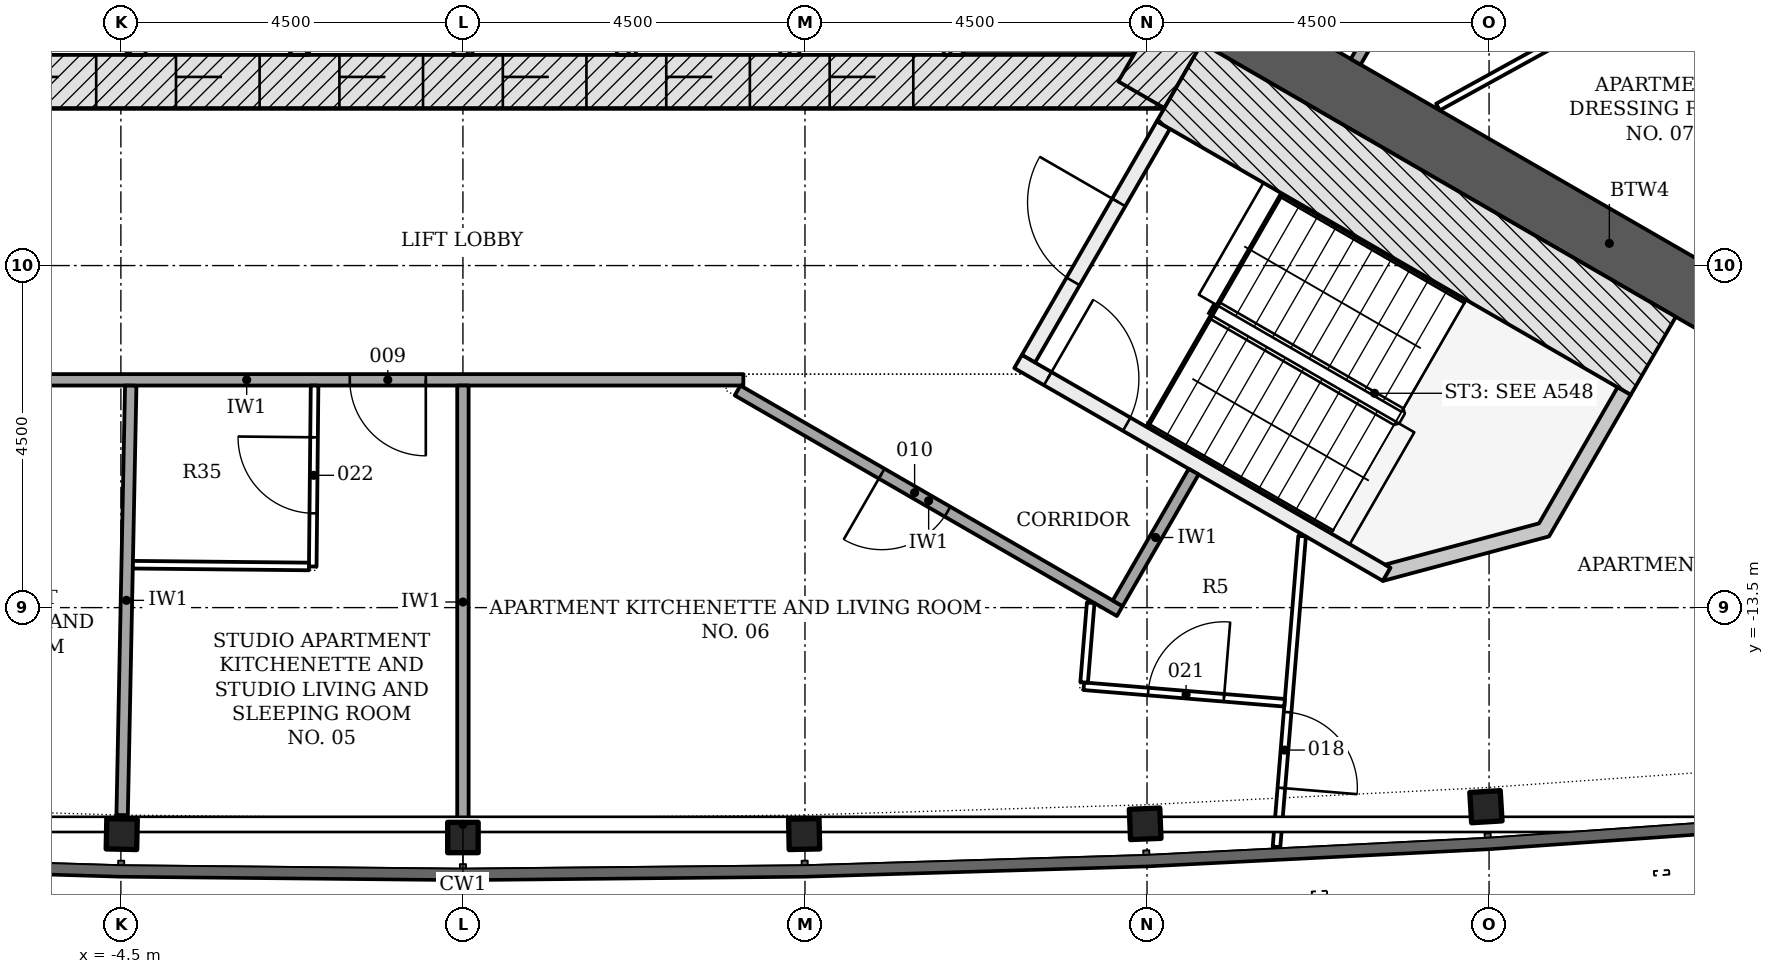
"""IFC4 building model, lengths in metres.
Left out: names, types, materials, properties, quantities, classifications, styles, units other than length and angle.
Written with IfcOpenShell. Run it as: python <this file> out.ifc"""

import sys

from ifc_helpers import new_model, si_unit, direction, frame, frame_2d, origin, origin_2d, place, context, subcontext, project, spatial, polyline, rectangle, i_section, outline, extrude, element, fill, save


model = new_model("IFC4")
c1 = context("Model", 3, precision=1e-05, world=origin(), true_north=direction((0.0, 1.0)))
c2 = subcontext(c1, "Body", "Model", "MODEL_VIEW")
j1 = project(units=[si_unit("LENGTHUNIT", "METRE"), si_unit("PLANEANGLEUNIT", "RADIAN")], contexts=[c1])
p1 = place(None, origin())
s1 = spatial("IfcSite", under=j1, at=p1, CompositionType="ELEMENT")
p2 = place(p1, origin())
s2 = spatial("IfcBuilding", under=s1, at=p2, CompositionType="ELEMENT")
p3 = place(p2, frame((0.0, 0.0, 109.5)))
s3 = spatial("IfcBuildingStorey", under=s2, at=p3, CompositionType="ELEMENT", Elevation=109.5)
p4 = place(p3, frame((-9.229, -6.578, -0.2), z_axis=(0.0, 0.0, 1.0), x_axis=(1.0, 0.0, 0.0)))
e1 = element("IfcWall", 1, at=p4, inside=s3, PredefinedType="SHEAR", context=c2, shape_type="SweptSolid", body=[
    extrude(rectangle(XDim=18.458, YDim=0.7, at=frame_2d((9.229, 0.0))), origin(), (0.0, 0.0, 1.0), 3.6),
])
p5 = place(p4, frame((3.304, 0.0, 0.2)))
e2 = element("IfcOpeningElement", 2, at=p5, cuts=e1, PredefinedType="OPENING", context=c2, shape_type="SweptSolid", body=[
    extrude(rectangle(XDim=1.1, YDim=2.1, at=frame_2d((0.55, 1.05))), frame((0.0, 0.36, 0.0), z_axis=(0.0, -1.0, 0.0), x_axis=(1.0, 0.0, 0.0)), (0.0, 0.0, 1.0), 0.72),
])
p6 = place(p4, frame((5.454, 0.0, 0.2)))
e3 = element("IfcOpeningElement", 3, at=p6, cuts=e1, PredefinedType="OPENING", context=c2, shape_type="SweptSolid", body=[
    extrude(rectangle(XDim=1.1, YDim=2.1, at=frame_2d((0.55, 1.05))), frame((0.0, 0.36, 0.0), z_axis=(0.0, -1.0, 0.0), x_axis=(1.0, 0.0, 0.0)), (0.0, 0.0, 1.0), 0.72),
])
p7 = place(p4, frame((7.604, 0.0, 0.2)))
e4 = element("IfcOpeningElement", 4, at=p7, cuts=e1, PredefinedType="OPENING", context=c2, shape_type="SweptSolid", body=[
    extrude(rectangle(XDim=1.1, YDim=2.1, at=frame_2d((0.55, 1.05))), frame((0.0, 0.36, 0.0), z_axis=(0.0, -1.0, 0.0), x_axis=(1.0, 0.0, 0.0)), (0.0, 0.0, 1.0), 0.72),
])
p8 = place(p4, frame((9.754, 0.0, 0.2)))
e5 = element("IfcOpeningElement", 5, at=p8, cuts=e1, PredefinedType="OPENING", context=c2, shape_type="SweptSolid", body=[
    extrude(rectangle(XDim=1.1, YDim=2.1, at=frame_2d((0.55, 1.05))), frame((0.0, 0.36, 0.0), z_axis=(0.0, -1.0, 0.0), x_axis=(1.0, 0.0, 0.0)), (0.0, 0.0, 1.0), 0.72),
])
p9 = place(p4, frame((11.904, 0.0, 0.2)))
e6 = element("IfcOpeningElement", 6, at=p9, cuts=e1, PredefinedType="OPENING", context=c2, shape_type="SweptSolid", body=[
    extrude(rectangle(XDim=1.1, YDim=2.1, at=frame_2d((0.55, 1.05))), frame((0.0, 0.36, 0.0), z_axis=(0.0, -1.0, 0.0), x_axis=(1.0, 0.0, 0.0)), (0.0, 0.0, 1.0), 0.72),
])
p10 = place(p4, frame((14.054, 0.0, 0.2)))
e7 = element("IfcOpeningElement", 7, at=p10, cuts=e1, PredefinedType="OPENING", context=c2, shape_type="SweptSolid", body=[
    extrude(rectangle(XDim=1.1, YDim=2.1, at=frame_2d((0.55, 1.05))), frame((0.0, 0.36, 0.0), z_axis=(0.0, -1.0, 0.0), x_axis=(1.0, 0.0, 0.0)), (0.0, 0.0, 1.0), 0.72),
])
p11 = place(p4, frame((1.029, 0.0, 0.2)))
e8 = element("IfcOpeningElement", 8, at=p11, cuts=e1, PredefinedType="OPENING", context=c2, shape_type="SweptSolid", body=[
    extrude(rectangle(XDim=1.0, YDim=2.1, at=frame_2d((0.5, 1.05))), frame((0.0, 0.36, 0.0), z_axis=(0.0, -1.0, 0.0), x_axis=(1.0, 0.0, 0.0)), (0.0, 0.0, 1.0), 0.72),
])
p12 = place(p3, frame((8.926, -6.753, -0.2), z_axis=(0.0, 0.0, 1.0), x_axis=(0.500042739161, 0.866000726912, 0.0)))
e9 = element("IfcWall", 9, at=p12, inside=s3, PredefinedType="SHEAR", context=c2, shape_type="SweptSolid", body=[
    extrude(rectangle(XDim=2.771, YDim=0.7, at=frame_2d((1.386, 0.0))), origin(), (0.0, 0.0, 1.0), 3.6),
])
p13 = place(p3, frame((9.922, -5.728, -0.2), z_axis=(0.0, 0.0, 1.0), x_axis=(0.866027307971, -0.499996701837, 0.0)))
e10 = element("IfcWall", 10, at=p13, inside=s3, PredefinedType="SHEAR", context=c2, shape_type="SweptSolid", body=[
    extrude(rectangle(XDim=11.918, YDim=0.8, at=frame_2d((5.959, 0.0))), origin(), (0.0, 0.0, 1.0), 3.6),
])
for number, where, z_axis, x_axis in (
    (11, (-4.489, -16.479, -0.2), (0.0, 0.0, 1.0), (1.0, -0.02, 0.0)),
    (12, (0.0, -16.524, -0.2), (0.0, 0.0, 1.0), (1.0, 0.0, 0.0)),
    (13, (4.489, -16.479, -0.2), (0.0, 0.0, 1.0), (1.0, 0.02, 0.0)),
    (14, (8.976, -16.344, -0.2), (0.0, 0.0, 1.0), (0.999, 0.04, 0.0)),
    (15, (13.459, -16.119, -0.2), (0.0, 0.0, 1.0), (0.998, 0.06, 0.0)),
):
    element("IfcColumn", number, at=place(p3, frame(where, z_axis=z_axis, x_axis=x_axis)), inside=s3, PredefinedType="COLUMN", context=c2, shape_type="SweptSolid", body=[
        extrude(i_section(OverallWidth=0.401, OverallDepth=0.399, WebThickness=0.025, FlangeThickness=0.04, FilletRadius=0.015, at=origin_2d()), origin(), (0.0, 0.0, 1.0), 3.6),
    ])
for number, where, z_axis, x_axis in (
    (16, (-4.3, -6.228, -0.2), (0.0, 0.0, 1.0), (0.0, 1.0, 0.0)),
    (17, (-2.15, -6.228, -0.2), (0.0, 0.0, 1.0), (0.0, 1.0, 0.0)),
    (18, (0.0, -6.228, -0.2), (0.0, 0.0, 1.0), (0.0, 1.0, 0.0)),
    (19, (2.15, -6.228, -0.2), (0.0, 0.0, 1.0), (0.0, 1.0, 0.0)),
    (20, (4.3, -6.228, -0.2), (0.0, 0.0, 1.0), (0.0, 1.0, 0.0)),
    (21, (6.45, -6.228, -0.2), (0.0, 0.0, 1.0), (0.0, 1.0, 0.0)),
):
    element("IfcWall", number, at=place(p3, frame(where, z_axis=z_axis, x_axis=x_axis)), inside=s3, PredefinedType="PARTITIONING", context=c2, shape_type="SweptSolid", body=[
        extrude(rectangle(XDim=2.5, YDim=0.25, at=frame_2d((1.25, 0.0))), origin(), (0.0, 0.0, 1.0), 3.6),
    ])
p14 = place(p3, frame((7.44, -10.226, -0.2), z_axis=(0.0, 0.0, 1.0), x_axis=(0.500022077904, 0.866012656725, 0.0)))
e22 = element("IfcWall", 22, at=p14, inside=s3, PredefinedType="SHEAR", context=c2, shape_type="SweptSolid", body=[
    extrude(rectangle(XDim=3.55, YDim=0.2, at=frame_2d((1.775, 0.0))), origin(), (0.0, 0.0, 1.0), 3.6),
])
p15 = place(p14, frame((1.175, 0.0, 0.2)))
e23 = element("IfcOpeningElement", 23, at=p15, cuts=e22, PredefinedType="OPENING", context=c2, shape_type="SweptSolid", body=[
    extrude(rectangle(XDim=1.2, YDim=2.1, at=frame_2d((0.6, 1.05))), frame((0.0, 0.11, 0.0), z_axis=(0.0, -1.0, 0.0), x_axis=(1.0, 0.0, 0.0)), (0.0, 0.0, 1.0), 0.22),
])
p16 = place(p3, frame((7.304, -10.262, -0.2), z_axis=(0.0, 0.0, 1.0), x_axis=(0.866026594901, -0.49999793692, 0.0)))
e24 = element("IfcWall", 24, at=p16, inside=s3, PredefinedType="SHEAR", context=c2, shape_type="SweptSolid", body=[
    extrude(rectangle(XDim=5.6, YDim=0.2, at=frame_2d((2.8, 0.0))), origin(), (0.0, 0.0, 1.0), 3.6),
])
p17 = place(p16, frame((0.45, 0.0, 0.2)))
e25 = element("IfcOpeningElement", 25, at=p17, cuts=e24, PredefinedType="OPENING", context=c2, shape_type="SweptSolid", body=[
    extrude(rectangle(XDim=1.2, YDim=2.1, at=frame_2d((0.6, 1.05))), frame((0.0, 0.11, 0.0), z_axis=(0.0, -1.0, 0.0), x_axis=(1.0, 0.0, 0.0)), (0.0, 0.0, 1.0), 0.22),
])
p18 = place(p3, frame((9.425, -6.588, -0.2), z_axis=(0.0, 0.0, 1.0), x_axis=(0.866018442252, -0.500012057535, 0.0)))
e26 = element("IfcWall", 26, at=p18, inside=s3, PredefinedType="SHEAR", context=c2, shape_type="SweptSolid", body=[
    extrude(rectangle(XDim=7.2, YDim=1.186, at=frame_2d((3.6, 0.0))), origin(), (0.0, 0.0, 1.0), 3.6),
])
p19 = place(p3, frame((0.0, 0.0, -0.2)))
e27 = element("IfcWall", 27, at=p19, inside=s3, PredefinedType="SHEAR", context=c2, shape_type="SweptSolid", body=[
    extrude(outline(polyline([(12.104, -13.149), (14.289, -12.563), (15.364, -10.701), (15.191, -10.601), (14.157, -12.392), (12.132, -12.934), (12.204, -12.976), (12.204, -12.976), (12.204, -12.976), (12.204, -12.976), (12.204, -12.976), (12.204, -12.976), (12.204, -12.976), (12.204, -12.976), (12.204, -12.976), (12.204, -12.976), (12.204, -12.976), (12.204, -12.976), (12.204, -12.976), (12.204, -12.976), (12.204, -12.976), (12.204, -12.976), (12.204, -12.976), (12.104, -13.149)])), origin(), (0.0, 0.0, 1.0), 3.6),
])
p20 = place(p3, frame((3.689, -10.503, 0.0), z_axis=(0.0, 0.0, 1.0), x_axis=(-1.0, 0.0, 0.0)))
e28 = element("IfcWall", 28, at=p20, inside=s3, PredefinedType="PARTITIONING", context=c2, shape_type="SweptSolid", body=[
    extrude(rectangle(XDim=13.068, YDim=0.15, at=frame_2d((6.534, 0.0))), origin(), (0.0, 0.0, 1.0), 2.847),
])
p21 = place(p20, frame((9.758, 0.0, 0.0)))
e29 = element("IfcOpeningElement", 29, at=p21, cuts=e28, PredefinedType="OPENING", context=c2, shape_type="SweptSolid", body=[
    extrude(rectangle(XDim=1.0, YDim=2.1, at=frame_2d((0.5, 1.05))), frame((0.0, 0.085, 0.0), z_axis=(0.0, -1.0, 0.0), x_axis=(1.0, 0.0, 0.0)), (0.0, 0.0, 1.0), 0.17),
])
p22 = place(p20, frame((4.177, 0.0, 0.0)))
e30 = element("IfcOpeningElement", 30, at=p22, cuts=e28, PredefinedType="OPENING", context=c2, shape_type="SweptSolid", body=[
    extrude(rectangle(XDim=1.0, YDim=2.1, at=frame_2d((0.5, 1.05))), frame((0.0, 0.085, 0.0), z_axis=(0.0, -1.0, 0.0), x_axis=(1.0, 0.0, 0.0)), (0.0, 0.0, 1.0), 0.17),
])
p23 = place(p3, frame((8.641, -13.546, 0.0), z_axis=(0.0, 0.0, 1.0), x_axis=(-0.866042728627, 0.499969991291, 0.0)))
e31 = element("IfcWall", 31, at=p23, inside=s3, PredefinedType="PARTITIONING", context=c2, shape_type="SweptSolid", body=[
    extrude(rectangle(XDim=5.805, YDim=0.15, at=frame_2d((2.903, 0.0))), origin(), (0.0, 0.0, 1.0), 2.847),
])
p24 = place(p23, frame((2.616, 0.0, 0.0)))
e32 = element("IfcOpeningElement", 32, at=p24, cuts=e31, PredefinedType="OPENING", context=c2, shape_type="SweptSolid", body=[
    extrude(rectangle(XDim=1.0, YDim=2.1, at=frame_2d((0.5, 1.05))), frame((0.0, 0.085, 0.0), z_axis=(0.0, -1.0, 0.0), x_axis=(1.0, 0.0, 0.0)), (0.0, 0.0, 1.0), 0.17),
])
p25 = place(p3, frame((8.614, -13.444, 0.0), z_axis=(0.0, 0.0, 1.0), x_axis=(0.499972520799, 0.866041268327, 0.0)))
e33 = element("IfcWall", 33, at=p25, inside=s3, PredefinedType="PARTITIONING", context=c2, shape_type="SweptSolid", body=[
    extrude(rectangle(XDim=2.0, YDim=0.15, at=frame_2d((1.0, 0.0))), origin(), (0.0, 0.0, 1.0), 2.923),
])
p26 = place(p3, frame((11.745, -6.319, 0.0), z_axis=(0.0, 0.0, 1.0), x_axis=(0.500012721296, 0.866018059016, 0.0)))
e34 = element("IfcWall", 34, at=p26, inside=s3, PredefinedType="PARTITIONING", context=c2, shape_type="SweptSolid", body=[
    extrude(rectangle(XDim=1.966, YDim=0.15, at=frame_2d((0.983, 0.0))), origin(), (0.0, 0.0, 1.0), 3.4),
])
p27 = place(p3, frame((0.0, -16.274, 0.0), z_axis=(0.0, 0.0, 1.0), x_axis=(0.0, 1.0, 0.0)))
e35 = element("IfcWall", 35, at=p27, inside=s3, PredefinedType="PARTITIONING", context=c2, shape_type="SweptSolid", body=[
    extrude(rectangle(XDim=5.696, YDim=0.15, at=frame_2d((2.848, 0.0))), origin(), (0.0, 0.0, 1.0), 2.847),
])
p28 = place(p3, frame((-4.484, -16.229, 0.0), z_axis=(0.0, 0.0, 1.0), x_axis=(0.020089281754, 0.999798190016, 0.0)))
e36 = element("IfcWall", 36, at=p28, inside=s3, PredefinedType="PARTITIONING", context=c2, shape_type="SweptSolid", body=[
    extrude(rectangle(XDim=5.651, YDim=0.15, at=frame_2d((2.826, 0.0))), origin(), (0.0, 0.0, 1.0), 2.847),
])
p29 = place(p3, frame((19.703, -10.864, 0.0), z_axis=(0.0, 0.0, 1.0), x_axis=(-0.482505676042, 0.875892843096, 0.0)))
e37 = element("IfcWall", 37, at=p29, inside=s3, PredefinedType="PARTITIONING", context=c2, shape_type="SweptSolid", body=[
    extrude(rectangle(XDim=10.377, YDim=0.1, at=frame_2d((5.188, 0.0))), origin(), (0.0, 0.0, 1.0), 2.847),
])
p30 = place(p29, frame((2.864, 0.0, 0.0)))
e38 = element("IfcOpeningElement", 38, at=p30, cuts=e37, PredefinedType="OPENING", context=c2, shape_type="SweptSolid", body=[
    extrude(rectangle(XDim=1.0, YDim=2.1, at=frame_2d((0.5, 1.05))), frame((0.0, 0.06, 0.0), z_axis=(0.0, -1.0, 0.0), x_axis=(1.0, 0.0, 0.0)), (0.0, 0.0, 1.0), 0.12),
])
p31 = place(p3, frame((16.389, -4.952, 0.0), z_axis=(0.0, 0.0, 1.0), x_axis=(-0.875896259157, -0.482499474814, 0.0)))
e39 = element("IfcWall", 39, at=p31, inside=s3, PredefinedType="PARTITIONING", context=c2, shape_type="SweptSolid", body=[
    extrude(rectangle(XDim=4.066, YDim=0.1, at=frame_2d((2.033, 0.0))), origin(), (0.0, 0.0, 1.0), 3.4),
])
p32 = place(p3, frame((11.04, -12.56, 0.0), z_axis=(0.0, 0.0, 1.0), x_axis=(-0.08207509454, -0.996626147989, 0.0)))
e40 = element("IfcWall", 40, at=p32, inside=s3, PredefinedType="PARTITIONING", context=c2, shape_type="SweptSolid", body=[
    extrude(rectangle(XDim=4.102, YDim=0.1, at=frame_2d((2.051, 0.0))), origin(), (0.0, 0.0, 1.0), 2.974),
])
p33 = place(p32, frame((2.324, 0.0, 0.0)))
e41 = element("IfcOpeningElement", 41, at=p33, cuts=e40, PredefinedType="OPENING", context=c2, shape_type="SweptSolid", body=[
    extrude(rectangle(XDim=1.0, YDim=2.1, at=frame_2d((0.5, 1.05))), frame((0.0, 0.06, 0.0), z_axis=(0.0, -1.0, 0.0), x_axis=(1.0, 0.0, 0.0)), (0.0, 0.0, 1.0), 0.12),
])
p34 = place(p3, frame((8.168, -14.534, 0.0), z_axis=(0.0, 0.0, 1.0), x_axis=(0.996625350035, -0.082084783406, 0.0)))
e42 = element("IfcWall", 42, at=p34, inside=s3, PredefinedType="PARTITIONING", context=c2, shape_type="SweptSolid", body=[
    extrude(rectangle(XDim=2.65, YDim=0.1, at=frame_2d((1.325, 0.0))), origin(), (0.0, 0.0, 1.0), 2.923),
])
p35 = place(p34, frame((0.85, 0.0, 0.0)))
e43 = element("IfcOpeningElement", 43, at=p35, cuts=e42, PredefinedType="OPENING", context=c2, shape_type="SweptSolid", body=[
    extrude(rectangle(XDim=1.0, YDim=2.1, at=frame_2d((0.5, 1.05))), frame((0.0, 0.06, 0.0), z_axis=(0.0, -1.0, 0.0), x_axis=(1.0, 0.0, 0.0)), (0.0, 0.0, 1.0), 0.12),
])
p36 = place(p3, frame((-1.976, -12.959, 0.0), z_axis=(0.0, 0.0, 1.0), x_axis=(0.009947205513, 0.999950525327, 0.0)))
e44 = element("IfcWall", 44, at=p36, inside=s3, PredefinedType="PARTITIONING", context=c2, shape_type="SweptSolid", body=[
    extrude(rectangle(XDim=2.381, YDim=0.1, at=frame_2d((1.19, 0.0))), origin(), (0.0, 0.0, 1.0), 3.4),
])
p37 = place(p36, frame((0.7, 0.0, 0.0)))
e45 = element("IfcOpeningElement", 45, at=p37, cuts=e44, PredefinedType="OPENING", context=c2, shape_type="SweptSolid", body=[
    extrude(rectangle(XDim=1.0, YDim=2.1, at=frame_2d((0.5, 1.05))), frame((0.0, 0.06, 0.0), z_axis=(0.0, -1.0, 0.0), x_axis=(1.0, 0.0, 0.0)), (0.0, 0.0, 1.0), 0.12),
])
p38 = place(p3, frame((-4.342, -12.936, 0.0), z_axis=(0.0, 0.0, 1.0), x_axis=(0.999949877213, -0.010012145693, 0.0)))
e46 = element("IfcWall", 46, at=p38, inside=s3, PredefinedType="PARTITIONING", context=c2, shape_type="SweptSolid", body=[
    extrude(rectangle(XDim=2.316, YDim=0.1, at=frame_2d((1.158, 0.0))), origin(), (0.0, 0.0, 1.0), 2.847),
])
p39 = place(p3, frame((8.259, -13.437, 0.0), z_axis=(0.0, 0.0, 1.0), x_axis=(-0.082180892167, -0.99661742959, 0.0)))
e47 = element("IfcWall", 47, at=p39, inside=s3, PredefinedType="PARTITIONING", context=c2, shape_type="SweptSolid", body=[
    extrude(rectangle(XDim=1.052, YDim=0.1, at=frame_2d((0.526, 0.0))), origin(), (0.0, 0.0, 1.0), 3.4),
])
p40 = place(p5, origin())
e48 = element("IfcDoor", 48, at=p40, inside=s3, OperationType="DOUBLE_DOOR_SLIDING", PredefinedType="DOOR", context=c2, shape_type="SweptSolid", body=[
    extrude(rectangle(XDim=1.1, YDim=2.1, at=frame_2d((0.55, 1.05))), frame((0.0, 0.025, 0.0), z_axis=(0.0, -1.0, 0.0), x_axis=(1.0, 0.0, 0.0)), (0.0, 0.0, 1.0), 0.05),
])
fill(e2, e48)
p41 = place(p6, origin())
e49 = element("IfcDoor", 49, at=p41, inside=s3, OperationType="DOUBLE_DOOR_SLIDING", PredefinedType="DOOR", context=c2, shape_type="SweptSolid", body=[
    extrude(rectangle(XDim=1.1, YDim=2.1, at=frame_2d((0.55, 1.05))), frame((0.0, 0.025, 0.0), z_axis=(0.0, -1.0, 0.0), x_axis=(1.0, 0.0, 0.0)), (0.0, 0.0, 1.0), 0.05),
])
fill(e3, e49)
p42 = place(p7, origin())
e50 = element("IfcDoor", 50, at=p42, inside=s3, OperationType="DOUBLE_DOOR_SLIDING", PredefinedType="DOOR", context=c2, shape_type="SweptSolid", body=[
    extrude(rectangle(XDim=1.1, YDim=2.1, at=frame_2d((0.55, 1.05))), frame((0.0, 0.025, 0.0), z_axis=(0.0, -1.0, 0.0), x_axis=(1.0, 0.0, 0.0)), (0.0, 0.0, 1.0), 0.05),
])
fill(e4, e50)
p43 = place(p8, origin())
e51 = element("IfcDoor", 51, at=p43, inside=s3, OperationType="DOUBLE_DOOR_SLIDING", PredefinedType="DOOR", context=c2, shape_type="SweptSolid", body=[
    extrude(rectangle(XDim=1.1, YDim=2.1, at=frame_2d((0.55, 1.05))), frame((0.0, 0.025, 0.0), z_axis=(0.0, -1.0, 0.0), x_axis=(1.0, 0.0, 0.0)), (0.0, 0.0, 1.0), 0.05),
])
fill(e5, e51)
p44 = place(p9, origin())
e52 = element("IfcDoor", 52, at=p44, inside=s3, OperationType="DOUBLE_DOOR_SLIDING", PredefinedType="DOOR", context=c2, shape_type="SweptSolid", body=[
    extrude(rectangle(XDim=1.1, YDim=2.1, at=frame_2d((0.55, 1.05))), frame((0.0, 0.025, 0.0), z_axis=(0.0, -1.0, 0.0), x_axis=(1.0, 0.0, 0.0)), (0.0, 0.0, 1.0), 0.05),
])
fill(e6, e52)
p45 = place(p10, origin())
e53 = element("IfcDoor", 53, at=p45, inside=s3, OperationType="DOUBLE_DOOR_SLIDING", PredefinedType="DOOR", context=c2, shape_type="SweptSolid", body=[
    extrude(rectangle(XDim=1.1, YDim=2.1, at=frame_2d((0.55, 1.05))), frame((0.0, 0.025, 0.0), z_axis=(0.0, -1.0, 0.0), x_axis=(1.0, 0.0, 0.0)), (0.0, 0.0, 1.0), 0.05),
])
fill(e7, e53)
p46 = place(p15, origin())
e54 = element("IfcDoor", 54, at=p46, inside=s3, OperationType="SINGLE_SWING_RIGHT", PredefinedType="DOOR", context=c2, shape_type="SweptSolid", body=[
    extrude(rectangle(XDim=1.2, YDim=2.1, at=frame_2d((0.6, 1.05))), frame((0.0, 0.025, 0.0), z_axis=(0.0, -1.0, 0.0), x_axis=(1.0, 0.0, 0.0)), (0.0, 0.0, 1.0), 0.05),
])
fill(e23, e54)
p47 = place(p17, origin())
e55 = element("IfcDoor", 55, at=p47, inside=s3, OperationType="SINGLE_SWING_LEFT", PredefinedType="DOOR", context=c2, shape_type="SweptSolid", body=[
    extrude(rectangle(XDim=1.2, YDim=2.1, at=frame_2d((0.6, 1.05))), frame((0.0, 0.025, 0.0), z_axis=(0.0, -1.0, 0.0), x_axis=(1.0, 0.0, 0.0)), (0.0, 0.0, 1.0), 0.05),
])
fill(e25, e55)
p48 = place(p22, origin())
e56 = element("IfcDoor", 56, at=p48, inside=s3, OperationType="SINGLE_SWING_LEFT", PredefinedType="DOOR", context=c2, shape_type="SweptSolid", body=[
    extrude(rectangle(XDim=1.0, YDim=2.1, at=frame_2d((0.5, 1.05))), frame((0.0, 0.025, 0.0), z_axis=(0.0, -1.0, 0.0), x_axis=(1.0, 0.0, 0.0)), (0.0, 0.0, 1.0), 0.05),
])
fill(e30, e56)
p49 = place(p24, origin())
e57 = element("IfcDoor", 57, at=p49, inside=s3, OperationType="SINGLE_SWING_RIGHT", PredefinedType="DOOR", context=c2, shape_type="SweptSolid", body=[
    extrude(rectangle(XDim=1.0, YDim=2.1, at=frame_2d((0.5, 1.05))), frame((0.0, 0.025, 0.0), z_axis=(0.0, -1.0, 0.0), x_axis=(1.0, 0.0, 0.0)), (0.0, 0.0, 1.0), 0.05),
])
fill(e32, e57)
p50 = place(p33, origin())
e58 = element("IfcDoor", 58, at=p50, inside=s3, OperationType="SINGLE_SWING_RIGHT", PredefinedType="DOOR", context=c2, shape_type="SweptSolid", body=[
    extrude(rectangle(XDim=1.0, YDim=2.1, at=frame_2d((0.5, 1.05))), frame((0.0, 0.025, 0.0), z_axis=(0.0, -1.0, 0.0), x_axis=(1.0, 0.0, 0.0)), (0.0, 0.0, 1.0), 0.05),
])
fill(e41, e58)
p51 = place(p35, origin())
e59 = element("IfcDoor", 59, at=p51, inside=s3, OperationType="SINGLE_SWING_RIGHT", PredefinedType="DOOR", context=c2, shape_type="SweptSolid", body=[
    extrude(rectangle(XDim=1.0, YDim=2.1, at=frame_2d((0.5, 1.05))), frame((0.0, 0.025, 0.0), z_axis=(0.0, -1.0, 0.0), x_axis=(1.0, 0.0, 0.0)), (0.0, 0.0, 1.0), 0.05),
])
fill(e43, e59)
p52 = place(p37, origin())
e60 = element("IfcDoor", 60, at=p52, inside=s3, OperationType="SINGLE_SWING_RIGHT", PredefinedType="DOOR", context=c2, shape_type="SweptSolid", body=[
    extrude(rectangle(XDim=1.0, YDim=2.1, at=frame_2d((0.5, 1.05))), frame((0.0, 0.025, 0.0), z_axis=(0.0, -1.0, 0.0), x_axis=(1.0, 0.0, 0.0)), (0.0, 0.0, 1.0), 0.05),
])
fill(e45, e60)
save(model, sys.argv[1])
